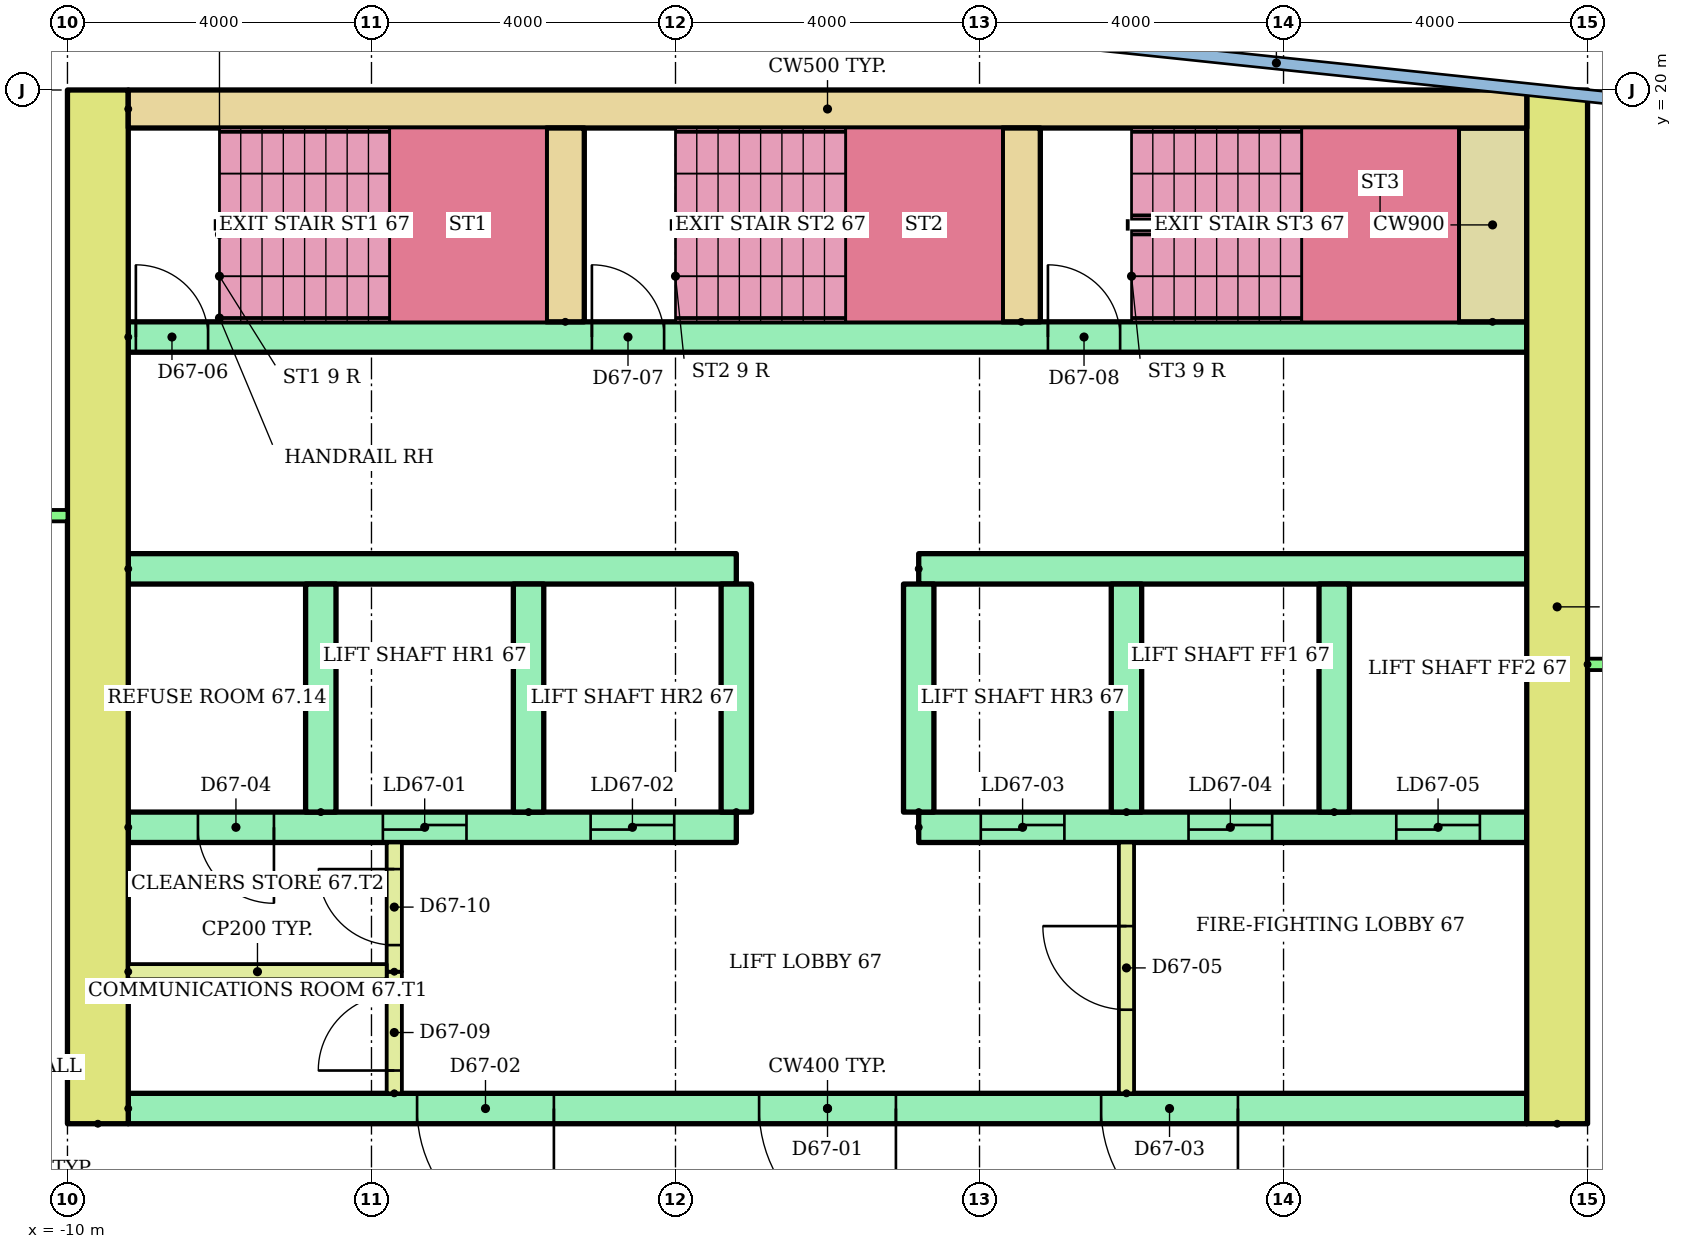
"""IFC4 building model, lengths in metres.
Left out: names, types, materials, properties, quantities, classifications, styles, units other than length and angle.
Written with IfcOpenShell. Run it as: python <this file> out.ifc"""

import sys

from ifc_helpers import new_model, si_unit, direction, frame, frame_2d, origin, place, context, subcontext, project, spatial, rectangle, extrude, element, fill, save


model = new_model("IFC4")
c1 = context("Model", 3, precision=1e-05, world=origin(), true_north=direction((0.0, 1.0)))
c2 = subcontext(c1, "Body", "Model", "MODEL_VIEW")
j1 = project(units=[si_unit("LENGTHUNIT", "METRE"), si_unit("PLANEANGLEUNIT", "RADIAN")], contexts=[c1])
p1 = place(None, origin())
s1 = spatial("IfcSite", under=j1, at=p1, CompositionType="ELEMENT")
p2 = place(p1, origin())
s2 = spatial("IfcBuilding", under=s1, at=p2, CompositionType="ELEMENT")
p3 = place(p2, frame((0.0, 0.0, 259.5)))
s3 = spatial("IfcBuildingStorey", under=s2, at=p3, CompositionType="ELEMENT", Elevation=259.5)
for number, where, z_axis, x_axis in (
    (1, (-9.6, 6.4, 0.0), (0.0, 0.0, 1.0), (0.0, 1.0, 0.0)),
    (2, (9.6, 6.4, 0.0), (0.0, 0.0, 1.0), (0.0, 1.0, 0.0)),
):
    element("IfcWall", number, at=place(p3, frame(where, z_axis=z_axis, x_axis=x_axis)), inside=s3, PredefinedType="SHEAR", context=c2, shape_type="SweptSolid", body=[
        extrude(rectangle(XDim=13.6, YDim=0.8, at=frame_2d((6.8, 0.0))), origin(), (0.0, 0.0, 1.0), 2.92),
    ])
p4 = place(p3, frame((-9.2, 19.75, 0.0)))
e3 = element("IfcWall", 3, at=p4, inside=s3, PredefinedType="SHEAR", context=c2, shape_type="SweptSolid", body=[
    extrude(rectangle(XDim=18.4, YDim=0.5, at=frame_2d((9.2, 0.0))), origin(), (0.0, 0.0, 1.0), 2.92),
])
p5 = place(p3, frame((-9.2, 6.6, 0.0)))
e4 = element("IfcWall", 4, at=p5, inside=s3, PredefinedType="SHEAR", context=c2, shape_type="SweptSolid", body=[
    extrude(rectangle(XDim=18.4, YDim=0.4, at=frame_2d((9.2, 0.0))), origin(), (0.0, 0.0, 1.0), 2.92),
])
p6 = place(p5, frame((8.3, 0.0, 0.0)))
e5 = element("IfcOpeningElement", 5, at=p6, cuts=e4, PredefinedType="OPENING", context=c2, shape_type="SweptSolid", body=[
    extrude(rectangle(XDim=1.8, YDim=2.1, at=frame_2d((0.9, 1.05))), frame((0.0, 0.21, 0.0), z_axis=(0.0, -1.0, 0.0), x_axis=(1.0, 0.0, 0.0)), (0.0, 0.0, 1.0), 0.42),
])
p7 = place(p5, frame((3.8, 0.0, 0.0)))
e6 = element("IfcOpeningElement", 6, at=p7, cuts=e4, PredefinedType="OPENING", context=c2, shape_type="SweptSolid", body=[
    extrude(rectangle(XDim=1.8, YDim=2.1, at=frame_2d((0.9, 1.05))), frame((0.0, 0.21, 0.0), z_axis=(0.0, -1.0, 0.0), x_axis=(1.0, 0.0, 0.0)), (0.0, 0.0, 1.0), 0.42),
])
p8 = place(p5, frame((12.8, 0.0, 0.0)))
e7 = element("IfcOpeningElement", 7, at=p8, cuts=e4, PredefinedType="OPENING", context=c2, shape_type="SweptSolid", body=[
    extrude(rectangle(XDim=1.8, YDim=2.1, at=frame_2d((0.9, 1.05))), frame((0.0, 0.21, 0.0), z_axis=(0.0, -1.0, 0.0), x_axis=(1.0, 0.0, 0.0)), (0.0, 0.0, 1.0), 0.42),
])
p9 = place(p3, frame((-9.2, 10.3, 0.0)))
e8 = element("IfcWall", 8, at=p9, inside=s3, PredefinedType="SHEAR", context=c2, shape_type="SweptSolid", body=[
    extrude(rectangle(XDim=8.0, YDim=0.4, at=frame_2d((4.0, 0.0))), origin(), (0.0, 0.0, 1.0), 2.92),
])
p10 = place(p9, frame((3.35, 0.0, 0.0)))
e9 = element("IfcOpeningElement", 9, at=p10, cuts=e8, PredefinedType="OPENING", context=c2, shape_type="SweptSolid", body=[
    extrude(rectangle(XDim=1.1, YDim=2.1, at=frame_2d((0.55, 1.05))), frame((0.0, 0.21, 0.0), z_axis=(0.0, -1.0, 0.0), x_axis=(1.0, 0.0, 0.0)), (0.0, 0.0, 1.0), 0.42),
])
p11 = place(p9, frame((6.083, 0.0, 0.0)))
e10 = element("IfcOpeningElement", 10, at=p11, cuts=e8, PredefinedType="OPENING", context=c2, shape_type="SweptSolid", body=[
    extrude(rectangle(XDim=1.1, YDim=2.1, at=frame_2d((0.55, 1.05))), frame((0.0, 0.21, 0.0), z_axis=(0.0, -1.0, 0.0), x_axis=(1.0, 0.0, 0.0)), (0.0, 0.0, 1.0), 0.42),
])
p12 = place(p9, frame((0.917, 0.0, 0.0)))
e11 = element("IfcOpeningElement", 11, at=p12, cuts=e8, PredefinedType="OPENING", context=c2, shape_type="SweptSolid", body=[
    extrude(rectangle(XDim=1.0, YDim=2.1, at=frame_2d((0.5, 1.05))), frame((0.0, 0.21, 0.0), z_axis=(0.0, -1.0, 0.0), x_axis=(1.0, 0.0, 0.0)), (0.0, 0.0, 1.0), 0.42),
])
p13 = place(p3, frame((-9.2, 13.7, 0.0)))
e12 = element("IfcWall", 12, at=p13, inside=s3, PredefinedType="SHEAR", context=c2, shape_type="SweptSolid", body=[
    extrude(rectangle(XDim=8.0, YDim=0.4, at=frame_2d((4.0, 0.0))), origin(), (0.0, 0.0, 1.0), 2.92),
])
p14 = place(p3, frame((1.2, 10.3, 0.0)))
e13 = element("IfcWall", 13, at=p14, inside=s3, PredefinedType="SHEAR", context=c2, shape_type="SweptSolid", body=[
    extrude(rectangle(XDim=8.0, YDim=0.4, at=frame_2d((4.0, 0.0))), origin(), (0.0, 0.0, 1.0), 2.92),
])
p15 = place(p14, frame((0.817, 0.0, 0.0)))
e14 = element("IfcOpeningElement", 14, at=p15, cuts=e13, PredefinedType="OPENING", context=c2, shape_type="SweptSolid", body=[
    extrude(rectangle(XDim=1.1, YDim=2.1, at=frame_2d((0.55, 1.05))), frame((0.0, 0.21, 0.0), z_axis=(0.0, -1.0, 0.0), x_axis=(1.0, 0.0, 0.0)), (0.0, 0.0, 1.0), 0.42),
])
p16 = place(p14, frame((3.55, 0.0, 0.0)))
e15 = element("IfcOpeningElement", 15, at=p16, cuts=e13, PredefinedType="OPENING", context=c2, shape_type="SweptSolid", body=[
    extrude(rectangle(XDim=1.1, YDim=2.1, at=frame_2d((0.55, 1.05))), frame((0.0, 0.21, 0.0), z_axis=(0.0, -1.0, 0.0), x_axis=(1.0, 0.0, 0.0)), (0.0, 0.0, 1.0), 0.42),
])
p17 = place(p14, frame((6.283, 0.0, 0.0)))
e16 = element("IfcOpeningElement", 16, at=p17, cuts=e13, PredefinedType="OPENING", context=c2, shape_type="SweptSolid", body=[
    extrude(rectangle(XDim=1.1, YDim=2.1, at=frame_2d((0.55, 1.05))), frame((0.0, 0.21, 0.0), z_axis=(0.0, -1.0, 0.0), x_axis=(1.0, 0.0, 0.0)), (0.0, 0.0, 1.0), 0.42),
])
p18 = place(p3, frame((1.2, 13.7, 0.0)))
e17 = element("IfcWall", 17, at=p18, inside=s3, PredefinedType="SHEAR", context=c2, shape_type="SweptSolid", body=[
    extrude(rectangle(XDim=8.0, YDim=0.4, at=frame_2d((4.0, 0.0))), origin(), (0.0, 0.0, 1.0), 2.92),
])
for number, where, z_axis, x_axis in (
    (18, (-6.667, 10.5, 0.0), (0.0, 0.0, 1.0), (0.0, 1.0, 0.0)),
    (19, (-3.933, 10.5, 0.0), (0.0, 0.0, 1.0), (0.0, 1.0, 0.0)),
    (20, (-1.2, 10.5, 0.0), (0.0, 0.0, 1.0), (0.0, 1.0, 0.0)),
    (21, (1.2, 10.5, 0.0), (0.0, 0.0, 1.0), (0.0, 1.0, 0.0)),
    (22, (3.933, 10.5, 0.0), (0.0, 0.0, 1.0), (0.0, 1.0, 0.0)),
    (23, (6.667, 10.5, 0.0), (0.0, 0.0, 1.0), (0.0, 1.0, 0.0)),
):
    element("IfcWall", number, at=place(p3, frame(where, z_axis=z_axis, x_axis=x_axis)), inside=s3, PredefinedType="SHEAR", context=c2, shape_type="SweptSolid", body=[
        extrude(rectangle(XDim=3.0, YDim=0.4, at=frame_2d((1.5, 0.0))), origin(), (0.0, 0.0, 1.0), 2.92),
    ])
p19 = place(p3, frame((3.933, 6.8, 0.0), z_axis=(0.0, 0.0, 1.0), x_axis=(0.0, 1.0, 0.0)))
e24 = element("IfcWall", 24, at=p19, inside=s3, PredefinedType="PARTITIONING", context=c2, shape_type="SweptSolid", body=[
    extrude(rectangle(XDim=3.3, YDim=0.2, at=frame_2d((1.65, 0.0))), origin(), (0.0, 0.0, 1.0), 2.92),
])
p20 = place(p19, frame((1.1, 0.0, 0.0)))
e25 = element("IfcOpeningElement", 25, at=p20, cuts=e24, PredefinedType="OPENING", context=c2, shape_type="SweptSolid", body=[
    extrude(rectangle(XDim=1.1, YDim=2.1, at=frame_2d((0.55, 1.05))), frame((0.0, 0.11, 0.0), z_axis=(0.0, -1.0, 0.0), x_axis=(1.0, 0.0, 0.0)), (0.0, 0.0, 1.0), 0.22),
])
p21 = place(p3, frame((-9.2, 16.75, 0.0)))
e26 = element("IfcWall", 26, at=p21, inside=s3, PredefinedType="SHEAR", context=c2, shape_type="SweptSolid", body=[
    extrude(rectangle(XDim=18.4, YDim=0.4, at=frame_2d((9.2, 0.0))), origin(), (0.0, 0.0, 1.0), 2.92),
])
p22 = place(p21, frame((0.1, 0.0, 0.0)))
e27 = element("IfcOpeningElement", 27, at=p22, cuts=e26, PredefinedType="OPENING", context=c2, shape_type="SweptSolid", body=[
    extrude(rectangle(XDim=0.95, YDim=2.1, at=frame_2d((0.475, 1.05))), frame((0.0, 0.21, 0.0), z_axis=(0.0, -1.0, 0.0), x_axis=(1.0, 0.0, 0.0)), (0.0, 0.0, 1.0), 0.42),
])
p23 = place(p21, frame((6.1, 0.0, 0.0)))
e28 = element("IfcOpeningElement", 28, at=p23, cuts=e26, PredefinedType="OPENING", context=c2, shape_type="SweptSolid", body=[
    extrude(rectangle(XDim=0.95, YDim=2.1, at=frame_2d((0.475, 1.05))), frame((0.0, 0.21, 0.0), z_axis=(0.0, -1.0, 0.0), x_axis=(1.0, 0.0, 0.0)), (0.0, 0.0, 1.0), 0.42),
])
p24 = place(p21, frame((12.1, 0.0, 0.0)))
e29 = element("IfcOpeningElement", 29, at=p24, cuts=e26, PredefinedType="OPENING", context=c2, shape_type="SweptSolid", body=[
    extrude(rectangle(XDim=0.95, YDim=2.1, at=frame_2d((0.475, 1.05))), frame((0.0, 0.21, 0.0), z_axis=(0.0, -1.0, 0.0), x_axis=(1.0, 0.0, 0.0)), (0.0, 0.0, 1.0), 0.42),
])
for number, where, z_axis, x_axis in (
    (30, (-3.45, 16.95, 0.0), (0.0, 0.0, 1.0), (0.0, 1.0, 0.0)),
    (31, (2.55, 16.95, 0.0), (0.0, 0.0, 1.0), (0.0, 1.0, 0.0)),
):
    element("IfcWall", number, at=place(p3, frame(where, z_axis=z_axis, x_axis=x_axis)), inside=s3, PredefinedType="SHEAR", context=c2, shape_type="SweptSolid", body=[
        extrude(rectangle(XDim=2.55, YDim=0.5, at=frame_2d((1.275, 0.0))), origin(), (0.0, 0.0, 1.0), 2.92),
    ])
p25 = place(p3, frame((8.75, 16.95, 0.0), z_axis=(0.0, 0.0, 1.0), x_axis=(0.0, 1.0, 0.0)))
e32 = element("IfcWall", 32, at=p25, inside=s3, PredefinedType="SHEAR", context=c2, shape_type="SweptSolid", body=[
    extrude(rectangle(XDim=2.55, YDim=0.9, at=frame_2d((1.275, 0.0))), origin(), (0.0, 0.0, 1.0), 2.92),
])
p26 = place(p3, frame((-5.7, 6.8, 0.0), z_axis=(0.0, 0.0, 1.0), x_axis=(0.0, 1.0, 0.0)))
e33 = element("IfcWall", 33, at=p26, inside=s3, PredefinedType="PARTITIONING", context=c2, shape_type="SweptSolid", body=[
    extrude(rectangle(XDim=1.6, YDim=0.2, at=frame_2d((0.8, 0.0))), origin(), (0.0, 0.0, 1.0), 2.92),
])
p27 = place(p26, frame((0.3, 0.0, 0.0)))
e34 = element("IfcOpeningElement", 34, at=p27, cuts=e33, PredefinedType="OPENING", context=c2, shape_type="SweptSolid", body=[
    extrude(rectangle(XDim=1.0, YDim=2.1, at=frame_2d((0.5, 1.05))), frame((0.0, 0.11, 0.0), z_axis=(0.0, -1.0, 0.0), x_axis=(1.0, 0.0, 0.0)), (0.0, 0.0, 1.0), 0.22),
])
p28 = place(p3, frame((-5.7, 8.4, 0.0), z_axis=(0.0, 0.0, 1.0), x_axis=(0.0, 1.0, 0.0)))
e35 = element("IfcWall", 35, at=p28, inside=s3, PredefinedType="PARTITIONING", context=c2, shape_type="SweptSolid", body=[
    extrude(rectangle(XDim=1.7, YDim=0.2, at=frame_2d((0.85, 0.0))), origin(), (0.0, 0.0, 1.0), 2.92),
])
p29 = place(p28, frame((0.35, 0.0, 0.0)))
e36 = element("IfcOpeningElement", 36, at=p29, cuts=e35, PredefinedType="OPENING", context=c2, shape_type="SweptSolid", body=[
    extrude(rectangle(XDim=1.0, YDim=2.1, at=frame_2d((0.5, 1.05))), frame((0.0, 0.11, 0.0), z_axis=(0.0, -1.0, 0.0), x_axis=(1.0, 0.0, 0.0)), (0.0, 0.0, 1.0), 0.22),
])
p30 = place(p3, frame((-9.2, 8.4, 0.0)))
e37 = element("IfcWall", 37, at=p30, inside=s3, PredefinedType="PARTITIONING", context=c2, shape_type="SweptSolid", body=[
    extrude(rectangle(XDim=3.4, YDim=0.2, at=frame_2d((1.7, 0.0))), origin(), (0.0, 0.0, 1.0), 2.92),
])
p31 = place(p3, frame((-21.89, 14.4, 0.0)))
e38 = element("IfcWall", 38, at=p31, inside=s3, PredefinedType="PARTITIONING", context=c2, shape_type="SweptSolid", body=[
    extrude(rectangle(XDim=11.89, YDim=0.15, at=frame_2d((5.945, 0.0))), origin(), (0.0, 0.0, 1.0), 2.4),
])
p32 = place(p31, frame((1.26, 0.0, 0.0)))
e39 = element("IfcOpeningElement", 39, at=p32, cuts=e38, PredefinedType="OPENING", context=c2, shape_type="SweptSolid", body=[
    extrude(rectangle(XDim=1.0, YDim=2.1, at=frame_2d((0.5, 1.05))), frame((0.0, 0.085, 0.0), z_axis=(0.0, -1.0, 0.0), x_axis=(1.0, 0.0, 0.0)), (0.0, 0.0, 1.0), 0.17),
])
p33 = place(p31, frame((8.304, 0.0, 0.0)))
e40 = element("IfcOpeningElement", 40, at=p33, cuts=e38, PredefinedType="OPENING", context=c2, shape_type="SweptSolid", body=[
    extrude(rectangle(XDim=0.9, YDim=2.1, at=frame_2d((0.45, 1.05))), frame((0.0, 0.085, 0.0), z_axis=(0.0, -1.0, 0.0), x_axis=(1.0, 0.0, 0.0)), (0.0, 0.0, 1.0), 0.17),
])
p34 = place(p3, frame((10.0, 12.443, 0.0)))
e41 = element("IfcWall", 41, at=p34, inside=s3, PredefinedType="PARTITIONING", context=c2, shape_type="SweptSolid", body=[
    extrude(rectangle(XDim=22.244, YDim=0.15, at=frame_2d((11.122, 0.0))), origin(), (0.0, 0.0, 1.0), 2.4),
])
p35 = place(p34, frame((3.47, 0.0, 0.0)))
e42 = element("IfcOpeningElement", 42, at=p35, cuts=e41, PredefinedType="OPENING", context=c2, shape_type="SweptSolid", body=[
    extrude(rectangle(XDim=0.9, YDim=2.1, at=frame_2d((0.45, 1.05))), frame((0.0, 0.085, 0.0), z_axis=(0.0, -1.0, 0.0), x_axis=(1.0, 0.0, 0.0)), (0.0, 0.0, 1.0), 0.17),
])
p36 = place(p34, frame((11.368, 0.0, 0.0)))
e43 = element("IfcOpeningElement", 43, at=p36, cuts=e41, PredefinedType="OPENING", context=c2, shape_type="SweptSolid", body=[
    extrude(rectangle(XDim=0.9, YDim=2.1, at=frame_2d((0.45, 1.05))), frame((0.0, 0.085, 0.0), z_axis=(0.0, -1.0, 0.0), x_axis=(1.0, 0.0, 0.0)), (0.0, 0.0, 1.0), 0.17),
])
p37 = place(p34, frame((18.427, 0.0, 0.0)))
e44 = element("IfcOpeningElement", 44, at=p37, cuts=e41, PredefinedType="OPENING", context=c2, shape_type="SweptSolid", body=[
    extrude(rectangle(XDim=1.0, YDim=2.1, at=frame_2d((0.5, 1.05))), frame((0.0, 0.085, 0.0), z_axis=(0.0, -1.0, 0.0), x_axis=(1.0, 0.0, 0.0)), (0.0, 0.0, 1.0), 0.17),
])
p38 = place(p6, frame((1.8, 0.0, 0.0), z_axis=(0.0, 0.0, 1.0), x_axis=(-1.0, 0.0, 0.0)))
e45 = element("IfcDoor", 45, at=p38, inside=s3, OperationType="DOUBLE_DOOR_SINGLE_SWING", PredefinedType="DOOR", context=c2, shape_type="SweptSolid", body=[
    extrude(rectangle(XDim=1.8, YDim=2.1, at=frame_2d((0.9, 1.05))), frame((0.0, 0.025, 0.0), z_axis=(0.0, -1.0, 0.0), x_axis=(1.0, 0.0, 0.0)), (0.0, 0.0, 1.0), 0.05),
])
fill(e5, e45)
p39 = place(p7, frame((1.8, 0.0, 0.0), z_axis=(0.0, 0.0, 1.0), x_axis=(-1.0, 0.0, 0.0)))
e46 = element("IfcDoor", 46, at=p39, inside=s3, OperationType="DOUBLE_DOOR_SINGLE_SWING", PredefinedType="DOOR", context=c2, shape_type="SweptSolid", body=[
    extrude(rectangle(XDim=1.8, YDim=2.1, at=frame_2d((0.9, 1.05))), frame((0.0, 0.025, 0.0), z_axis=(0.0, -1.0, 0.0), x_axis=(1.0, 0.0, 0.0)), (0.0, 0.0, 1.0), 0.05),
])
fill(e6, e46)
p40 = place(p8, frame((1.8, 0.0, 0.0), z_axis=(0.0, 0.0, 1.0), x_axis=(-1.0, 0.0, 0.0)))
e47 = element("IfcDoor", 47, at=p40, inside=s3, OperationType="DOUBLE_DOOR_SINGLE_SWING", PredefinedType="DOOR", context=c2, shape_type="SweptSolid", body=[
    extrude(rectangle(XDim=1.8, YDim=2.1, at=frame_2d((0.9, 1.05))), frame((0.0, 0.025, 0.0), z_axis=(0.0, -1.0, 0.0), x_axis=(1.0, 0.0, 0.0)), (0.0, 0.0, 1.0), 0.05),
])
fill(e7, e47)
p41 = place(p10, origin())
e48 = element("IfcDoor", 48, at=p41, inside=s3, OperationType="SLIDING_TO_LEFT", PredefinedType="DOOR", context=c2, shape_type="SweptSolid", body=[
    extrude(rectangle(XDim=1.1, YDim=2.1, at=frame_2d((0.55, 1.05))), frame((0.0, 0.025, 0.0), z_axis=(0.0, -1.0, 0.0), x_axis=(1.0, 0.0, 0.0)), (0.0, 0.0, 1.0), 0.05),
])
fill(e9, e48)
p42 = place(p11, origin())
e49 = element("IfcDoor", 49, at=p42, inside=s3, OperationType="SLIDING_TO_LEFT", PredefinedType="DOOR", context=c2, shape_type="SweptSolid", body=[
    extrude(rectangle(XDim=1.1, YDim=2.1, at=frame_2d((0.55, 1.05))), frame((0.0, 0.025, 0.0), z_axis=(0.0, -1.0, 0.0), x_axis=(1.0, 0.0, 0.0)), (0.0, 0.0, 1.0), 0.05),
])
fill(e10, e49)
p43 = place(p15, origin())
e50 = element("IfcDoor", 50, at=p43, inside=s3, OperationType="SLIDING_TO_LEFT", PredefinedType="DOOR", context=c2, shape_type="SweptSolid", body=[
    extrude(rectangle(XDim=1.1, YDim=2.1, at=frame_2d((0.55, 1.05))), frame((0.0, 0.025, 0.0), z_axis=(0.0, -1.0, 0.0), x_axis=(1.0, 0.0, 0.0)), (0.0, 0.0, 1.0), 0.05),
])
fill(e14, e50)
p44 = place(p16, origin())
e51 = element("IfcDoor", 51, at=p44, inside=s3, OperationType="SLIDING_TO_LEFT", PredefinedType="DOOR", context=c2, shape_type="SweptSolid", body=[
    extrude(rectangle(XDim=1.1, YDim=2.1, at=frame_2d((0.55, 1.05))), frame((0.0, 0.025, 0.0), z_axis=(0.0, -1.0, 0.0), x_axis=(1.0, 0.0, 0.0)), (0.0, 0.0, 1.0), 0.05),
])
fill(e15, e51)
p45 = place(p17, origin())
e52 = element("IfcDoor", 52, at=p45, inside=s3, OperationType="SLIDING_TO_LEFT", PredefinedType="DOOR", context=c2, shape_type="SweptSolid", body=[
    extrude(rectangle(XDim=1.1, YDim=2.1, at=frame_2d((0.55, 1.05))), frame((0.0, 0.025, 0.0), z_axis=(0.0, -1.0, 0.0), x_axis=(1.0, 0.0, 0.0)), (0.0, 0.0, 1.0), 0.05),
])
fill(e16, e52)
p46 = place(p12, frame((1.0, 0.0, 0.0), z_axis=(0.0, 0.0, 1.0), x_axis=(-1.0, 0.0, 0.0)))
e53 = element("IfcDoor", 53, at=p46, inside=s3, OperationType="SINGLE_SWING_RIGHT", PredefinedType="DOOR", context=c2, shape_type="SweptSolid", body=[
    extrude(rectangle(XDim=1.0, YDim=2.1, at=frame_2d((0.5, 1.05))), frame((0.0, 0.025, 0.0), z_axis=(0.0, -1.0, 0.0), x_axis=(1.0, 0.0, 0.0)), (0.0, 0.0, 1.0), 0.05),
])
fill(e11, e53)
p47 = place(p20, origin())
e54 = element("IfcDoor", 54, at=p47, inside=s3, OperationType="SINGLE_SWING_RIGHT", PredefinedType="DOOR", context=c2, shape_type="SweptSolid", body=[
    extrude(rectangle(XDim=1.1, YDim=2.1, at=frame_2d((0.55, 1.05))), frame((0.0, 0.025, 0.0), z_axis=(0.0, -1.0, 0.0), x_axis=(1.0, 0.0, 0.0)), (0.0, 0.0, 1.0), 0.05),
])
fill(e25, e54)
p48 = place(p22, origin())
e55 = element("IfcDoor", 55, at=p48, inside=s3, OperationType="SINGLE_SWING_LEFT", PredefinedType="DOOR", context=c2, shape_type="SweptSolid", body=[
    extrude(rectangle(XDim=0.95, YDim=2.1, at=frame_2d((0.475, 1.05))), frame((0.0, 0.025, 0.0), z_axis=(0.0, -1.0, 0.0), x_axis=(1.0, 0.0, 0.0)), (0.0, 0.0, 1.0), 0.05),
])
fill(e27, e55)
p49 = place(p23, origin())
e56 = element("IfcDoor", 56, at=p49, inside=s3, OperationType="SINGLE_SWING_LEFT", PredefinedType="DOOR", context=c2, shape_type="SweptSolid", body=[
    extrude(rectangle(XDim=0.95, YDim=2.1, at=frame_2d((0.475, 1.05))), frame((0.0, 0.025, 0.0), z_axis=(0.0, -1.0, 0.0), x_axis=(1.0, 0.0, 0.0)), (0.0, 0.0, 1.0), 0.05),
])
fill(e28, e56)
p50 = place(p24, origin())
e57 = element("IfcDoor", 57, at=p50, inside=s3, OperationType="SINGLE_SWING_LEFT", PredefinedType="DOOR", context=c2, shape_type="SweptSolid", body=[
    extrude(rectangle(XDim=0.95, YDim=2.1, at=frame_2d((0.475, 1.05))), frame((0.0, 0.025, 0.0), z_axis=(0.0, -1.0, 0.0), x_axis=(1.0, 0.0, 0.0)), (0.0, 0.0, 1.0), 0.05),
])
fill(e29, e57)
p51 = place(p27, origin())
e58 = element("IfcDoor", 58, at=p51, inside=s3, OperationType="SINGLE_SWING_LEFT", PredefinedType="DOOR", context=c2, shape_type="SweptSolid", body=[
    extrude(rectangle(XDim=1.0, YDim=2.1, at=frame_2d((0.5, 1.05))), frame((0.0, 0.025, 0.0), z_axis=(0.0, -1.0, 0.0), x_axis=(1.0, 0.0, 0.0)), (0.0, 0.0, 1.0), 0.05),
])
fill(e34, e58)
p52 = place(p29, origin())
e59 = element("IfcDoor", 59, at=p52, inside=s3, OperationType="SINGLE_SWING_RIGHT", PredefinedType="DOOR", context=c2, shape_type="SweptSolid", body=[
    extrude(rectangle(XDim=1.0, YDim=2.1, at=frame_2d((0.5, 1.05))), frame((0.0, 0.025, 0.0), z_axis=(0.0, -1.0, 0.0), x_axis=(1.0, 0.0, 0.0)), (0.0, 0.0, 1.0), 0.05),
])
fill(e36, e59)
save(model, sys.argv[1])
